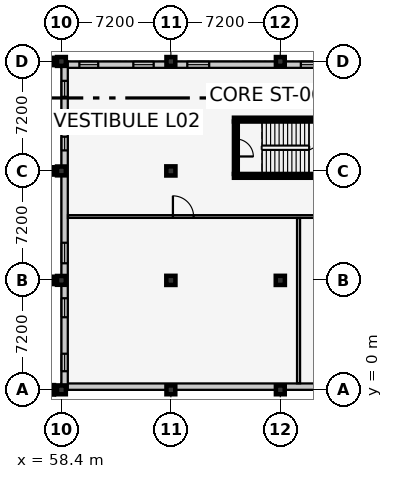
"""IFC4 building model, lengths in metres.
Left out: names, types, materials, properties, quantities, classifications, styles, units other than length and angle.
Written with IfcOpenShell. Run it as: python <this file> out.ifc"""

import sys

from ifc_helpers import new_model, si_unit, direction, frame, frame_2d, origin, origin_2d, place, context, subcontext, project, spatial, rectangle, extrude, element, fill, save


model = new_model("IFC4")
c1 = context("Model", 3, precision=1e-05, world=origin(), true_north=direction((0.0, 1.0)))
c2 = subcontext(c1, "Body", "Model", "MODEL_VIEW")
j1 = project(units=[si_unit("LENGTHUNIT", "METRE"), si_unit("PLANEANGLEUNIT", "RADIAN")], contexts=[c1])
p1 = place(None, origin())
s1 = spatial("IfcSite", under=j1, at=p1, CompositionType="ELEMENT")
p2 = place(p1, origin())
s2 = spatial("IfcBuilding", under=s1, at=p2, CompositionType="ELEMENT")
p3 = place(p2, frame((0.0, 0.0, 9.6)))
s3 = spatial("IfcBuildingStorey", under=s2, at=p3, CompositionType="ELEMENT", Elevation=9.6)
p4 = place(p3, frame((57.6, 0.0, 0.0), z_axis=(0.0, 0.0, 1.0), x_axis=(1.0, 0.0, 0.0)))
e1 = element("IfcColumn", 1, at=p4, inside=s3, PredefinedType="COLUMN", context=c2, shape_type="SweptSolid", body=[
    extrude(rectangle(XDim=0.62, YDim=0.62, at=origin_2d()), origin(), (0.0, 0.0, 1.0), 4.2),
])
for number, where, z_axis, x_axis in (
    (2, (57.6, 7.2, 0.0), (0.0, 0.0, 1.0), (1.0, 0.0, 0.0)),
    (3, (57.6, 14.4, 0.0), (0.0, 0.0, 1.0), (1.0, 0.0, 0.0)),
    (4, (57.6, 21.6, 0.0), (0.0, 0.0, 1.0), (1.0, 0.0, 0.0)),
):
    element("IfcColumn", number, at=place(p3, frame(where, z_axis=z_axis, x_axis=x_axis)), inside=s3, PredefinedType="COLUMN", context=c2, shape_type="SweptSolid", body=[
        extrude(rectangle(XDim=0.48, YDim=0.48, at=origin_2d()), origin(), (0.0, 0.0, 1.0), 4.2),
    ])
for number, where, z_axis, x_axis in (
    (5, (58.4, 0.0, 0.0), (0.0, 0.0, 1.0), (1.0, 0.0, 0.0)),
    (6, (58.4, 7.2, 0.0), (0.0, 0.0, 1.0), (1.0, 0.0, 0.0)),
    (7, (58.4, 14.4, 0.0), (0.0, 0.0, 1.0), (1.0, 0.0, 0.0)),
    (8, (58.4, 21.6, 0.0), (0.0, 0.0, 1.0), (1.0, 0.0, 0.0)),
    (9, (65.6, 0.0, 0.0), (0.0, 0.0, 1.0), (1.0, 0.0, 0.0)),
):
    element("IfcColumn", number, at=place(p3, frame(where, z_axis=z_axis, x_axis=x_axis)), inside=s3, PredefinedType="COLUMN", context=c2, shape_type="SweptSolid", body=[
        extrude(rectangle(XDim=0.58, YDim=0.58, at=origin_2d()), origin(), (0.0, 0.0, 1.0), 4.2),
    ])
for number, where, z_axis, x_axis in (
    (10, (65.6, 7.2, 0.0), (0.0, 0.0, 1.0), (1.0, 0.0, 0.0)),
    (11, (65.6, 14.4, 0.0), (0.0, 0.0, 1.0), (1.0, 0.0, 0.0)),
):
    element("IfcColumn", number, at=place(p3, frame(where, z_axis=z_axis, x_axis=x_axis)), inside=s3, PredefinedType="COLUMN", context=c2, shape_type="SweptSolid", body=[
        extrude(rectangle(XDim=0.6, YDim=0.6, at=origin_2d()), origin(), (0.0, 0.0, 1.0), 4.2),
    ])
for number, where, z_axis, x_axis in (
    (12, (65.6, 21.6, 0.0), (0.0, 0.0, 1.0), (1.0, 0.0, 0.0)),
    (13, (72.8, 0.0, 0.0), (0.0, 0.0, 1.0), (1.0, 0.0, 0.0)),
):
    element("IfcColumn", number, at=place(p3, frame(where, z_axis=z_axis, x_axis=x_axis)), inside=s3, PredefinedType="COLUMN", context=c2, shape_type="SweptSolid", body=[
        extrude(rectangle(XDim=0.58, YDim=0.58, at=origin_2d()), origin(), (0.0, 0.0, 1.0), 4.2),
    ])
p5 = place(p3, frame((72.8, 7.2, 0.0), z_axis=(0.0, 0.0, 1.0), x_axis=(1.0, 0.0, 0.0)))
e14 = element("IfcColumn", 14, at=p5, inside=s3, PredefinedType="COLUMN", context=c2, shape_type="SweptSolid", body=[
    extrude(rectangle(XDim=0.6, YDim=0.6, at=origin_2d()), origin(), (0.0, 0.0, 1.0), 4.2),
])
p6 = place(p3, frame((72.8, 21.6, 0.0), z_axis=(0.0, 0.0, 1.0), x_axis=(1.0, 0.0, 0.0)))
e15 = element("IfcColumn", 15, at=p6, inside=s3, PredefinedType="COLUMN", context=c2, shape_type="SweptSolid", body=[
    extrude(rectangle(XDim=0.58, YDim=0.58, at=origin_2d()), origin(), (0.0, 0.0, 1.0), 4.2),
])
p7 = place(p3, frame((101.6, 0.21, 0.0), z_axis=(0.0, 0.0, 1.0), x_axis=(-1.0, 0.0, 0.0)))
e16 = element("IfcWall", 16, at=p7, inside=s3, PredefinedType="SOLIDWALL", context=c2, shape_type="SweptSolid", body=[
    extrude(rectangle(XDim=43.2, YDim=0.42, at=frame_2d((21.6, 0.0))), origin(), (0.0, 0.0, 1.0), 3.255),
])
p8 = place(p3, frame((58.4, 21.39, 0.0), z_axis=(0.0, 0.0, 1.0), x_axis=(1.0, 0.0, 0.0)))
e17 = element("IfcWall", 17, at=p8, inside=s3, PredefinedType="SOLIDWALL", context=c2, shape_type="SweptSolid", body=[
    extrude(rectangle(XDim=43.2, YDim=0.42, at=frame_2d((21.6, 0.0))), origin(), (0.0, 0.0, 1.0), 3.255),
])
p9 = place(p8, frame((1.18, 0.0, 0.9)))
e18 = element("IfcOpeningElement", 18, at=p9, cuts=e17, PredefinedType="OPENING", context=c2, shape_type="SweptSolid", body=[
    extrude(rectangle(XDim=1.24, YDim=1.75, at=frame_2d((0.62, 0.875))), frame((0.0, 0.222, 0.0), z_axis=(0.0, -1.0, 0.0), x_axis=(1.0, 0.0, 0.0)), (0.0, 0.0, 1.0), 0.444),
])
p10 = place(p8, frame((4.73, 0.0, 0.9)))
e19 = element("IfcOpeningElement", 19, at=p10, cuts=e17, PredefinedType="OPENING", context=c2, shape_type="SweptSolid", body=[
    extrude(rectangle(XDim=1.34, YDim=1.75, at=frame_2d((0.67, 0.875))), frame((0.0, 0.222, 0.0), z_axis=(0.0, -1.0, 0.0), x_axis=(1.0, 0.0, 0.0)), (0.0, 0.0, 1.0), 0.444),
])
p11 = place(p8, frame((8.28, 0.0, 0.9)))
e20 = element("IfcOpeningElement", 20, at=p11, cuts=e17, PredefinedType="OPENING", context=c2, shape_type="SweptSolid", body=[
    extrude(rectangle(XDim=1.44, YDim=1.75, at=frame_2d((0.72, 0.875))), frame((0.0, 0.222, 0.0), z_axis=(0.0, -1.0, 0.0), x_axis=(1.0, 0.0, 0.0)), (0.0, 0.0, 1.0), 0.444),
])
p12 = place(p8, frame((15.75, 0.0, 0.9)))
e21 = element("IfcOpeningElement", 21, at=p12, cuts=e17, PredefinedType="OPENING", context=c2, shape_type="SweptSolid", body=[
    extrude(rectangle(XDim=0.9, YDim=1.35, at=frame_2d((0.45, 0.675))), frame((0.0, 0.222, 0.0), z_axis=(0.0, -1.0, 0.0), x_axis=(1.0, 0.0, 0.0)), (0.0, 0.0, 1.0), 0.444),
])
p13 = place(p8, frame((19.3, 0.0, 0.9)))
e22 = element("IfcOpeningElement", 22, at=p13, cuts=e17, PredefinedType="OPENING", context=c2, shape_type="SweptSolid", body=[
    extrude(rectangle(XDim=1.0, YDim=1.35, at=frame_2d((0.5, 0.675))), frame((0.0, 0.222, 0.0), z_axis=(0.0, -1.0, 0.0), x_axis=(1.0, 0.0, 0.0)), (0.0, 0.0, 1.0), 0.444),
])
p14 = place(p8, frame((22.85, 0.0, 0.9)))
e23 = element("IfcOpeningElement", 23, at=p14, cuts=e17, PredefinedType="OPENING", context=c2, shape_type="SweptSolid", body=[
    extrude(rectangle(XDim=1.1, YDim=1.35, at=frame_2d((0.55, 0.675))), frame((0.0, 0.222, 0.0), z_axis=(0.0, -1.0, 0.0), x_axis=(1.0, 0.0, 0.0)), (0.0, 0.0, 1.0), 0.444),
])
p15 = place(p8, frame((29.95, 0.0, 0.9)))
e24 = element("IfcOpeningElement", 24, at=p15, cuts=e17, PredefinedType="OPENING", context=c2, shape_type="SweptSolid", body=[
    extrude(rectangle(XDim=1.3, YDim=1.35, at=frame_2d((0.65, 0.675))), frame((0.0, 0.222, 0.0), z_axis=(0.0, -1.0, 0.0), x_axis=(1.0, 0.0, 0.0)), (0.0, 0.0, 1.0), 0.444),
])
p16 = place(p8, frame((33.5, 0.0, 0.9)))
e25 = element("IfcOpeningElement", 25, at=p16, cuts=e17, PredefinedType="OPENING", context=c2, shape_type="SweptSolid", body=[
    extrude(rectangle(XDim=1.4, YDim=1.35, at=frame_2d((0.7, 0.675))), frame((0.0, 0.222, 0.0), z_axis=(0.0, -1.0, 0.0), x_axis=(1.0, 0.0, 0.0)), (0.0, 0.0, 1.0), 0.444),
])
p17 = place(p8, frame((37.325, 0.0, 0.9)))
e26 = element("IfcOpeningElement", 26, at=p17, cuts=e17, PredefinedType="OPENING", context=c2, shape_type="SweptSolid", body=[
    extrude(rectangle(XDim=0.95, YDim=1.45, at=frame_2d((0.475, 0.725))), frame((0.0, 0.222, 0.0), z_axis=(0.0, -1.0, 0.0), x_axis=(1.0, 0.0, 0.0)), (0.0, 0.0, 1.0), 0.444),
])
p18 = place(p8, frame((40.875, 0.0, 0.9)))
e27 = element("IfcOpeningElement", 27, at=p18, cuts=e17, PredefinedType="OPENING", context=c2, shape_type="SweptSolid", body=[
    extrude(rectangle(XDim=1.05, YDim=1.45, at=frame_2d((0.525, 0.725))), frame((0.0, 0.222, 0.0), z_axis=(0.0, -1.0, 0.0), x_axis=(1.0, 0.0, 0.0)), (0.0, 0.0, 1.0), 0.444),
])
p19 = place(p3, frame((58.61, 0.0, 0.0), z_axis=(0.0, 0.0, 1.0), x_axis=(0.0, 1.0, 0.0)))
e28 = element("IfcWall", 28, at=p19, inside=s3, PredefinedType="SOLIDWALL", context=c2, shape_type="SweptSolid", body=[
    extrude(rectangle(XDim=21.6, YDim=0.42, at=frame_2d((10.8, 0.0))), origin(), (0.0, 0.0, 1.0), 3.355),
])
p20 = place(p19, frame((1.225, 0.0, 0.9)))
e29 = element("IfcOpeningElement", 29, at=p20, cuts=e28, PredefinedType="OPENING", context=c2, shape_type="SweptSolid", body=[
    extrude(rectangle(XDim=1.15, YDim=1.45, at=frame_2d((0.575, 0.725))), frame((0.0, 0.222, 0.0), z_axis=(0.0, -1.0, 0.0), x_axis=(1.0, 0.0, 0.0)), (0.0, 0.0, 1.0), 0.444),
])
p21 = place(p19, frame((4.775, 0.0, 0.9)))
e30 = element("IfcOpeningElement", 30, at=p21, cuts=e28, PredefinedType="OPENING", context=c2, shape_type="SweptSolid", body=[
    extrude(rectangle(XDim=1.25, YDim=1.45, at=frame_2d((0.625, 0.725))), frame((0.0, 0.222, 0.0), z_axis=(0.0, -1.0, 0.0), x_axis=(1.0, 0.0, 0.0)), (0.0, 0.0, 1.0), 0.444),
])
p22 = place(p19, frame((8.325, 0.0, 0.9)))
e31 = element("IfcOpeningElement", 31, at=p22, cuts=e28, PredefinedType="OPENING", context=c2, shape_type="SweptSolid", body=[
    extrude(rectangle(XDim=1.35, YDim=1.45, at=frame_2d((0.675, 0.725))), frame((0.0, 0.222, 0.0), z_axis=(0.0, -1.0, 0.0), x_axis=(1.0, 0.0, 0.0)), (0.0, 0.0, 1.0), 0.444),
])
p23 = place(p19, frame((15.75, 0.0, 0.9)))
e32 = element("IfcOpeningElement", 32, at=p23, cuts=e28, PredefinedType="OPENING", context=c2, shape_type="SweptSolid", body=[
    extrude(rectangle(XDim=0.9, YDim=1.6, at=frame_2d((0.45, 0.8))), frame((0.0, 0.222, 0.0), z_axis=(0.0, -1.0, 0.0), x_axis=(1.0, 0.0, 0.0)), (0.0, 0.0, 1.0), 0.444),
])
p24 = place(p19, frame((19.275, 0.0, 0.9)))
e33 = element("IfcOpeningElement", 33, at=p24, cuts=e28, PredefinedType="OPENING", context=c2, shape_type="SweptSolid", body=[
    extrude(rectangle(XDim=1.05, YDim=1.6, at=frame_2d((0.525, 0.8))), frame((0.0, 0.222, 0.0), z_axis=(0.0, -1.0, 0.0), x_axis=(1.0, 0.0, 0.0)), (0.0, 0.0, 1.0), 0.444),
])
for number, where, z_axis, x_axis in (
    (34, (69.75, 14.075, 0.0), (0.0, 0.0, 1.0), (1.0, 0.0, 0.0)),
    (35, (78.65, 17.775, 0.0), (0.0, 0.0, 1.0), (-1.0, 0.0, 0.0)),
):
    element("IfcWall", number, at=place(p3, frame(where, z_axis=z_axis, x_axis=x_axis)), inside=s3, PredefinedType="SHEAR", context=c2, shape_type="SweptSolid", body=[
        extrude(rectangle(XDim=8.9, YDim=0.25, at=frame_2d((4.45, 0.0))), origin(), (0.0, 0.0, 1.0), 3.96),
    ])
p25 = place(p3, frame((69.875, 17.65, 0.0), z_axis=(0.0, 0.0, 1.0), x_axis=(0.0, -1.0, 0.0)))
e36 = element("IfcWall", 36, at=p25, inside=s3, PredefinedType="SHEAR", context=c2, shape_type="SweptSolid", body=[
    extrude(rectangle(XDim=3.45, YDim=0.25, at=frame_2d((1.725, 0.0))), origin(), (0.0, 0.0, 1.0), 3.96),
])
p26 = place(p25, frame((1.15, 0.0, 0.0)))
e37 = element("IfcOpeningElement", 37, at=p26, cuts=e36, PredefinedType="OPENING", context=c2, shape_type="SweptSolid", body=[
    extrude(rectangle(XDim=1.15, YDim=2.15, at=frame_2d((0.575, 1.075))), frame((0.0, 0.137, 0.0), z_axis=(0.0, -1.0, 0.0), x_axis=(1.0, 0.0, 0.0)), (0.0, 0.0, 1.0), 0.274),
])
p27 = place(p3, frame((58.83, 11.4, 0.0), z_axis=(0.0, 0.0, 1.0), x_axis=(1.0, 0.0, 0.0)))
e38 = element("IfcWall", 38, at=p27, inside=s3, PredefinedType="PARTITIONING", context=c2, shape_type="SweptSolid", body=[
    extrude(rectangle(XDim=42.34, YDim=0.18, at=frame_2d((21.17, 0.0))), origin(), (0.0, 0.0, 1.0), 3.96),
])
p28 = place(p27, frame((6.905, 0.0, 0.0)))
e39 = element("IfcOpeningElement", 39, at=p28, cuts=e38, PredefinedType="OPENING", context=c2, shape_type="SweptSolid", body=[
    extrude(rectangle(XDim=1.36, YDim=2.2, at=frame_2d((0.68, 1.1))), frame((0.0, 0.102, 0.0), z_axis=(0.0, -1.0, 0.0), x_axis=(1.0, 0.0, 0.0)), (0.0, 0.0, 1.0), 0.204),
])
p29 = place(p27, frame((21.49, 0.0, 0.0)))
e40 = element("IfcOpeningElement", 40, at=p29, cuts=e38, PredefinedType="OPENING", context=c2, shape_type="SweptSolid", body=[
    extrude(rectangle(XDim=1.36, YDim=2.2, at=frame_2d((0.68, 1.1))), frame((0.0, 0.102, 0.0), z_axis=(0.0, -1.0, 0.0), x_axis=(1.0, 0.0, 0.0)), (0.0, 0.0, 1.0), 0.204),
])
p30 = place(p27, frame((35.075, 0.0, 0.0)))
e41 = element("IfcOpeningElement", 41, at=p30, cuts=e38, PredefinedType="OPENING", context=c2, shape_type="SweptSolid", body=[
    extrude(rectangle(XDim=1.36, YDim=2.2, at=frame_2d((0.68, 1.1))), frame((0.0, 0.102, 0.0), z_axis=(0.0, -1.0, 0.0), x_axis=(1.0, 0.0, 0.0)), (0.0, 0.0, 1.0), 0.204),
])
p31 = place(p3, frame((74.0, 0.43, 0.0), z_axis=(0.0, 0.0, 1.0), x_axis=(0.0, 1.0, 0.0)))
e42 = element("IfcWall", 42, at=p31, inside=s3, PredefinedType="PARTITIONING", context=c2, shape_type="SweptSolid", body=[
    extrude(rectangle(XDim=10.87, YDim=0.2, at=frame_2d((5.435, 0.0))), origin(), (0.0, 0.0, 1.0), 3.96),
])
p32 = place(p9, origin())
e43 = element("IfcWindow", 43, at=p32, inside=s3, PartitioningType="SINGLE_PANEL", PredefinedType="WINDOW", context=c2, shape_type="SweptSolid", body=[
    extrude(rectangle(XDim=1.24, YDim=1.75, at=frame_2d((0.62, 0.875))), frame((0.0, 0.03, 0.0), z_axis=(0.0, -1.0, 0.0), x_axis=(1.0, 0.0, 0.0)), (0.0, 0.0, 1.0), 0.06),
])
fill(e18, e43)
p33 = place(p10, origin())
e44 = element("IfcWindow", 44, at=p33, inside=s3, PartitioningType="SINGLE_PANEL", PredefinedType="WINDOW", context=c2, shape_type="SweptSolid", body=[
    extrude(rectangle(XDim=1.34, YDim=1.75, at=frame_2d((0.67, 0.875))), frame((0.0, 0.03, 0.0), z_axis=(0.0, -1.0, 0.0), x_axis=(1.0, 0.0, 0.0)), (0.0, 0.0, 1.0), 0.06),
])
fill(e19, e44)
p34 = place(p11, origin())
e45 = element("IfcWindow", 45, at=p34, inside=s3, PartitioningType="SINGLE_PANEL", PredefinedType="WINDOW", context=c2, shape_type="SweptSolid", body=[
    extrude(rectangle(XDim=1.44, YDim=1.75, at=frame_2d((0.72, 0.875))), frame((0.0, 0.03, 0.0), z_axis=(0.0, -1.0, 0.0), x_axis=(1.0, 0.0, 0.0)), (0.0, 0.0, 1.0), 0.06),
])
fill(e20, e45)
p35 = place(p12, origin())
e46 = element("IfcWindow", 46, at=p35, inside=s3, PartitioningType="SINGLE_PANEL", PredefinedType="WINDOW", context=c2, shape_type="SweptSolid", body=[
    extrude(rectangle(XDim=0.9, YDim=1.35, at=frame_2d((0.45, 0.675))), frame((0.0, 0.03, 0.0), z_axis=(0.0, -1.0, 0.0), x_axis=(1.0, 0.0, 0.0)), (0.0, 0.0, 1.0), 0.06),
])
fill(e21, e46)
p36 = place(p20, origin())
e47 = element("IfcWindow", 47, at=p36, inside=s3, PartitioningType="SINGLE_PANEL", PredefinedType="WINDOW", context=c2, shape_type="SweptSolid", body=[
    extrude(rectangle(XDim=1.15, YDim=1.45, at=frame_2d((0.575, 0.725))), frame((0.0, 0.03, 0.0), z_axis=(0.0, -1.0, 0.0), x_axis=(1.0, 0.0, 0.0)), (0.0, 0.0, 1.0), 0.06),
])
fill(e29, e47)
p37 = place(p21, origin())
e48 = element("IfcWindow", 48, at=p37, inside=s3, PartitioningType="SINGLE_PANEL", PredefinedType="WINDOW", context=c2, shape_type="SweptSolid", body=[
    extrude(rectangle(XDim=1.25, YDim=1.45, at=frame_2d((0.625, 0.725))), frame((0.0, 0.03, 0.0), z_axis=(0.0, -1.0, 0.0), x_axis=(1.0, 0.0, 0.0)), (0.0, 0.0, 1.0), 0.06),
])
fill(e30, e48)
p38 = place(p22, origin())
e49 = element("IfcWindow", 49, at=p38, inside=s3, PartitioningType="SINGLE_PANEL", PredefinedType="WINDOW", context=c2, shape_type="SweptSolid", body=[
    extrude(rectangle(XDim=1.35, YDim=1.45, at=frame_2d((0.675, 0.725))), frame((0.0, 0.03, 0.0), z_axis=(0.0, -1.0, 0.0), x_axis=(1.0, 0.0, 0.0)), (0.0, 0.0, 1.0), 0.06),
])
fill(e31, e49)
p39 = place(p23, origin())
e50 = element("IfcWindow", 50, at=p39, inside=s3, PartitioningType="SINGLE_PANEL", PredefinedType="WINDOW", context=c2, shape_type="SweptSolid", body=[
    extrude(rectangle(XDim=0.9, YDim=1.6, at=frame_2d((0.45, 0.8))), frame((0.0, 0.03, 0.0), z_axis=(0.0, -1.0, 0.0), x_axis=(1.0, 0.0, 0.0)), (0.0, 0.0, 1.0), 0.06),
])
fill(e32, e50)
p40 = place(p24, origin())
e51 = element("IfcWindow", 51, at=p40, inside=s3, PartitioningType="SINGLE_PANEL", PredefinedType="WINDOW", context=c2, shape_type="SweptSolid", body=[
    extrude(rectangle(XDim=1.05, YDim=1.6, at=frame_2d((0.525, 0.8))), frame((0.0, 0.03, 0.0), z_axis=(0.0, -1.0, 0.0), x_axis=(1.0, 0.0, 0.0)), (0.0, 0.0, 1.0), 0.06),
])
fill(e33, e51)
p41 = place(p26, origin())
e52 = element("IfcDoor", 52, at=p41, inside=s3, OperationType="SINGLE_SWING_RIGHT", PredefinedType="DOOR", context=c2, shape_type="SweptSolid", body=[
    extrude(rectangle(XDim=1.15, YDim=2.15, at=frame_2d((0.575, 1.075))), frame((0.0, 0.025, 0.0), z_axis=(0.0, -1.0, 0.0), x_axis=(1.0, 0.0, 0.0)), (0.0, 0.0, 1.0), 0.05),
])
fill(e37, e52)
p42 = place(p28, origin())
e53 = element("IfcDoor", 53, at=p42, inside=s3, OperationType="SINGLE_SWING_LEFT", PredefinedType="DOOR", context=c2, shape_type="SweptSolid", body=[
    extrude(rectangle(XDim=1.36, YDim=2.2, at=frame_2d((0.68, 1.1))), frame((0.0, 0.025, 0.0), z_axis=(0.0, -1.0, 0.0), x_axis=(1.0, 0.0, 0.0)), (0.0, 0.0, 1.0), 0.05),
])
fill(e39, e53)
save(model, sys.argv[1])
